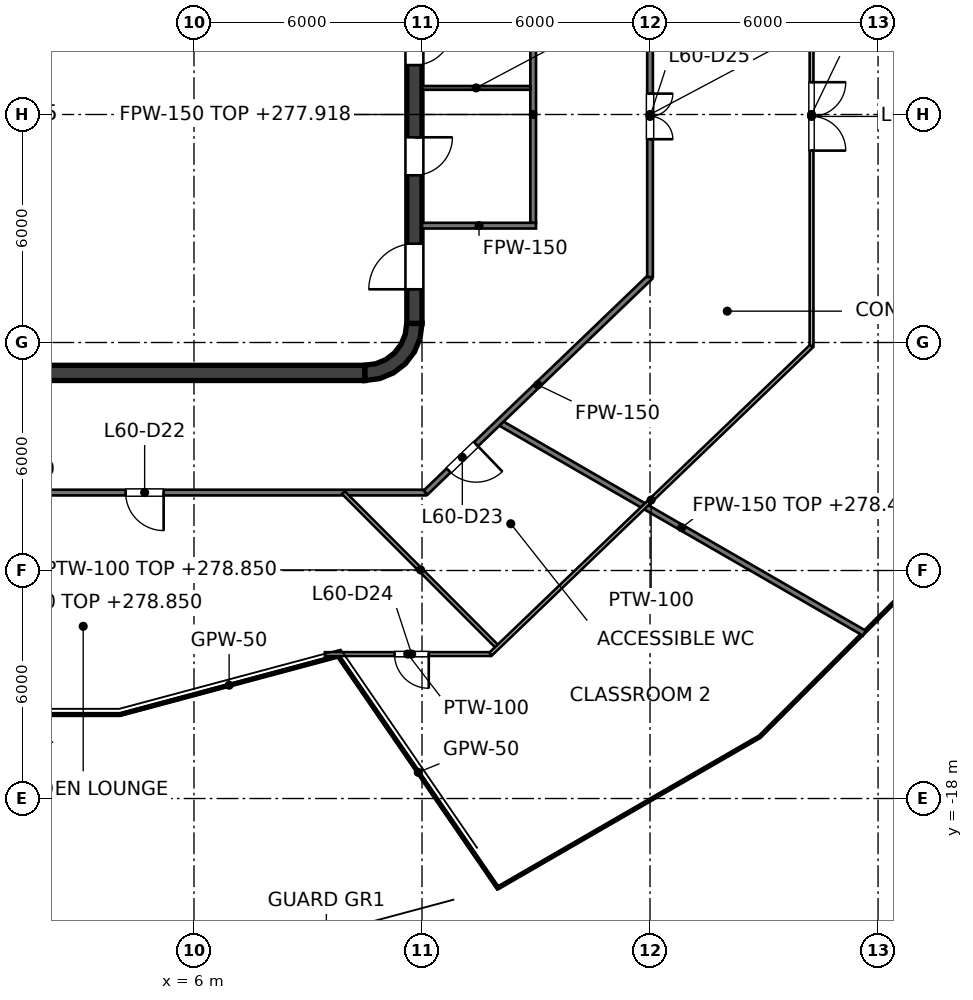
"""IFC4 building model, lengths in metres.
Left out: names, types, materials, properties, quantities, classifications, styles, units other than length and angle.
Written with IfcOpenShell. Run it as: python <this file> out.ifc"""

import sys

from ifc_helpers import new_model, si_unit, direction, frame, frame_2d, origin, place, context, subcontext, project, spatial, polyline, rectangle, outline, extrude, element, fill, save


model = new_model("IFC4")
c1 = context("Model", 3, precision=1e-05, world=origin(), true_north=direction((0.0, 1.0)))
c2 = subcontext(c1, "Body", "Model", "MODEL_VIEW")
j1 = project(units=[si_unit("LENGTHUNIT", "METRE"), si_unit("PLANEANGLEUNIT", "RADIAN")], contexts=[c1])
p1 = place(None, origin())
s1 = spatial("IfcSite", under=j1, at=p1, CompositionType="ELEMENT")
p2 = place(p1, origin())
s2 = spatial("IfcBuilding", under=s1, at=p2, CompositionType="ELEMENT")
p3 = place(p2, frame((0.0, 0.0, 275.0)))
s3 = spatial("IfcBuildingStorey", under=s2, at=p3, CompositionType="ELEMENT", Elevation=275.0)
p4 = place(p3, frame((-10.5, -6.8, 0.0), z_axis=(0.0, 0.0, 1.0), x_axis=(1.0, 0.0, 0.0)))
e1 = element("IfcWall", 1, at=p4, inside=s3, PredefinedType="SHEAR", context=c2, shape_type="SweptSolid", body=[
    extrude(rectangle(XDim=21.0, YDim=0.4, at=frame_2d((10.5, 0.0))), origin(), (0.0, 0.0, 1.0), 4.0),
])
p5 = place(p3, frame((11.8, -5.5, 0.0), z_axis=(0.0, 0.0, 1.0), x_axis=(0.0, 1.0, 0.0)))
e2 = element("IfcWall", 2, at=p5, inside=s3, PredefinedType="SHEAR", context=c2, shape_type="SweptSolid", body=[
    extrude(rectangle(XDim=11.0, YDim=0.4, at=frame_2d((5.5, 0.0))), origin(), (0.0, 0.0, 1.0), 4.0),
])
p6 = place(p5, frame((3.9, 0.0, 0.0)))
e3 = element("IfcOpeningElement", 3, at=p6, cuts=e2, PredefinedType="OPENING", context=c2, shape_type="SweptSolid", body=[
    extrude(rectangle(XDim=1.0, YDim=2.1, at=frame_2d((0.5, 1.05))), frame((0.0, 0.2, 0.0), z_axis=(0.0, -1.0, 0.0), x_axis=(1.0, 0.0, 0.0)), (0.0, 0.0, 1.0), 0.4),
])
p7 = place(p5, frame((6.8, 0.0, 0.0)))
e4 = element("IfcOpeningElement", 4, at=p7, cuts=e2, PredefinedType="OPENING", context=c2, shape_type="SweptSolid", body=[
    extrude(rectangle(XDim=1.0, YDim=2.1, at=frame_2d((0.5, 1.05))), frame((0.0, 0.2, 0.0), z_axis=(0.0, -1.0, 0.0), x_axis=(1.0, 0.0, 0.0)), (0.0, 0.0, 1.0), 0.4),
])
p8 = place(p5, frame((0.9, 0.0, 0.0)))
e5 = element("IfcOpeningElement", 5, at=p8, cuts=e2, PredefinedType="OPENING", context=c2, shape_type="SweptSolid", body=[
    extrude(rectangle(XDim=1.2, YDim=2.1, at=frame_2d((0.6, 1.05))), frame((0.0, 0.2, 0.0), z_axis=(0.0, -1.0, 0.0), x_axis=(1.0, 0.0, 0.0)), (0.0, 0.0, 1.0), 0.4),
])
p9 = place(p5, frame((8.9, 0.0, 0.0)))
e6 = element("IfcOpeningElement", 6, at=p9, cuts=e2, PredefinedType="OPENING", context=c2, shape_type="SweptSolid", body=[
    extrude(rectangle(XDim=1.2, YDim=2.1, at=frame_2d((0.6, 1.05))), frame((0.0, 0.2, 0.0), z_axis=(0.0, -1.0, 0.0), x_axis=(1.0, 0.0, 0.0)), (0.0, 0.0, 1.0), 0.4),
])
p10 = place(p3, origin())
e7 = element("IfcWall", 7, at=p10, inside=s3, PredefinedType="SHEAR", context=c2, shape_type="SweptSolid", body=[
    extrude(outline(polyline([(12.0, -5.5), (11.596, -5.5), (11.559, -5.784), (11.45, -6.048), (11.275, -6.275), (11.048, -6.45), (10.784, -6.559), (10.5, -6.596), (10.5, -7.0), (10.888, -6.949), (11.25, -6.799), (11.561, -6.561), (11.799, -6.25), (11.949, -5.888), (12.0, -5.5)])), origin(), (0.0, 0.0, 1.0), 4.0),
])
p11 = place(p3, frame((9.0, -6.6, 0.0), z_axis=(0.0, 0.0, 1.0), x_axis=(0.0, 1.0, 0.0)))
e8 = element("IfcWall", 8, at=p11, inside=s3, PredefinedType="SOLIDWALL", context=c2, shape_type="SweptSolid", body=[
    extrude(rectangle(XDim=2.5, YDim=0.25, at=frame_2d((1.25, 0.0))), origin(), (0.0, 0.0, 1.0), 3.85),
])
p12 = place(p11, frame((0.65, 0.0, 0.0)))
e9 = element("IfcOpeningElement", 9, at=p12, cuts=e8, PredefinedType="OPENING", context=c2, shape_type="SweptSolid", body=[
    extrude(rectangle(XDim=1.2, YDim=2.1, at=frame_2d((0.6, 1.05))), frame((0.0, 0.125, 0.0), z_axis=(0.0, -1.0, 0.0), x_axis=(1.0, 0.0, 0.0)), (0.0, 0.0, 1.0), 0.25),
])
p13 = place(p3, frame((3.15, -6.6, 0.0), z_axis=(0.0, 0.0, 1.0), x_axis=(0.0, 1.0, 0.0)))
e10 = element("IfcWall", 10, at=p13, inside=s3, PredefinedType="SOLIDWALL", context=c2, shape_type="SweptSolid", body=[
    extrude(rectangle(XDim=2.5, YDim=0.25, at=frame_2d((1.25, 0.0))), origin(), (0.0, 0.0, 1.0), 3.85),
])
p14 = place(p3, frame((0.775, 1.525, 0.0), z_axis=(0.0, 0.0, 1.0), x_axis=(1.0, 0.0, 0.0)))
e11 = element("IfcWall", 11, at=p14, inside=s3, PredefinedType="SOLIDWALL", context=c2, shape_type="SweptSolid", body=[
    extrude(rectangle(XDim=8.35, YDim=0.25, at=frame_2d((4.175, 0.0))), origin(), (0.0, 0.0, 1.0), 3.85),
])
p15 = place(p14, frame((0.925, 0.0, 0.0)))
e12 = element("IfcOpeningElement", 12, at=p15, cuts=e11, PredefinedType="OPENING", context=c2, shape_type="SweptSolid", body=[
    extrude(rectangle(XDim=1.1, YDim=2.1, at=frame_2d((0.55, 1.05))), frame((0.0, 0.125, 0.0), z_axis=(0.0, -1.0, 0.0), x_axis=(1.0, 0.0, 0.0)), (0.0, 0.0, 1.0), 0.25),
])
p16 = place(p14, frame((3.625, 0.0, 0.0)))
e13 = element("IfcOpeningElement", 13, at=p16, cuts=e11, PredefinedType="OPENING", context=c2, shape_type="SweptSolid", body=[
    extrude(rectangle(XDim=1.1, YDim=2.1, at=frame_2d((0.55, 1.05))), frame((0.0, 0.125, 0.0), z_axis=(0.0, -1.0, 0.0), x_axis=(1.0, 0.0, 0.0)), (0.0, 0.0, 1.0), 0.25),
])
p17 = place(p14, frame((6.325, 0.0, 0.0)))
e14 = element("IfcOpeningElement", 14, at=p17, cuts=e11, PredefinedType="OPENING", context=c2, shape_type="SweptSolid", body=[
    extrude(rectangle(XDim=1.1, YDim=2.1, at=frame_2d((0.55, 1.05))), frame((0.0, 0.125, 0.0), z_axis=(0.0, -1.0, 0.0), x_axis=(1.0, 0.0, 0.0)), (0.0, 0.0, 1.0), 0.25),
])
p18 = place(p3, frame((-9.125, -1.525, 0.0), z_axis=(0.0, 0.0, 1.0), x_axis=(1.0, 0.0, 0.0)))
e15 = element("IfcWall", 15, at=p18, inside=s3, PredefinedType="SOLIDWALL", context=c2, shape_type="SweptSolid", body=[
    extrude(rectangle(XDim=18.25, YDim=0.25, at=frame_2d((9.125, 0.0))), origin(), (0.0, 0.0, 1.0), 3.85),
])
p19 = place(p18, frame((7.15, 0.0, 0.0)))
e16 = element("IfcOpeningElement", 16, at=p19, cuts=e15, PredefinedType="OPENING", context=c2, shape_type="SweptSolid", body=[
    extrude(rectangle(XDim=1.2, YDim=2.1, at=frame_2d((0.6, 1.05))), frame((0.0, 0.125, 0.0), z_axis=(0.0, -1.0, 0.0), x_axis=(1.0, 0.0, 0.0)), (0.0, 0.0, 1.0), 0.25),
])
p20 = place(p18, frame((10.2, 0.0, 0.0)))
e17 = element("IfcOpeningElement", 17, at=p20, cuts=e15, PredefinedType="OPENING", context=c2, shape_type="SweptSolid", body=[
    extrude(rectangle(XDim=1.2, YDim=2.1, at=frame_2d((0.6, 1.05))), frame((0.0, 0.125, 0.0), z_axis=(0.0, -1.0, 0.0), x_axis=(1.0, 0.0, 0.0)), (0.0, 0.0, 1.0), 0.25),
])
p21 = place(p18, frame((16.075, 0.0, 0.0)))
e18 = element("IfcOpeningElement", 18, at=p21, cuts=e15, PredefinedType="OPENING", context=c2, shape_type="SweptSolid", body=[
    extrude(rectangle(XDim=1.0, YDim=2.1, at=frame_2d((0.5, 1.05))), frame((0.0, 0.125, 0.0), z_axis=(0.0, -1.0, 0.0), x_axis=(1.0, 0.0, 0.0)), (0.0, 0.0, 1.0), 0.25),
])
p22 = place(p3, frame((-9.125, -3.975, 0.0), z_axis=(0.0, 0.0, 1.0), x_axis=(1.0, 0.0, 0.0)))
e19 = element("IfcWall", 19, at=p22, inside=s3, PredefinedType="SOLIDWALL", context=c2, shape_type="SweptSolid", body=[
    extrude(rectangle(XDim=12.4, YDim=0.25, at=frame_2d((6.2, 0.0))), origin(), (0.0, 0.0, 1.0), 3.85),
])
p23 = place(p22, frame((1.05, 0.0, 0.0)))
e20 = element("IfcOpeningElement", 20, at=p23, cuts=e19, PredefinedType="OPENING", context=c2, shape_type="SweptSolid", body=[
    extrude(rectangle(XDim=1.2, YDim=2.1, at=frame_2d((0.6, 1.05))), frame((0.0, 0.125, 0.0), z_axis=(0.0, -1.0, 0.0), x_axis=(1.0, 0.0, 0.0)), (0.0, 0.0, 1.0), 0.25),
])
p24 = place(p22, frame((4.1, 0.0, 0.0)))
e21 = element("IfcOpeningElement", 21, at=p24, cuts=e19, PredefinedType="OPENING", context=c2, shape_type="SweptSolid", body=[
    extrude(rectangle(XDim=1.2, YDim=2.1, at=frame_2d((0.6, 1.05))), frame((0.0, 0.125, 0.0), z_axis=(0.0, -1.0, 0.0), x_axis=(1.0, 0.0, 0.0)), (0.0, 0.0, 1.0), 0.25),
])
p25 = place(p3, frame((3.275, -3.975, 0.0), z_axis=(0.0, 0.0, 1.0), x_axis=(1.0, 0.0, 0.0)))
e22 = element("IfcWall", 22, at=p25, inside=s3, PredefinedType="SOLIDWALL", context=c2, shape_type="SweptSolid", body=[
    extrude(rectangle(XDim=5.85, YDim=0.25, at=frame_2d((2.925, 0.0))), origin(), (0.0, 0.0, 1.0), 3.85),
])
for number, where, z_axis, x_axis in (
    (23, (3.2, -3.85, 0.0), (0.0, 0.0, 1.0), (0.0, 1.0, 0.0)),
    (24, (5.9, -3.85, 0.0), (0.0, 0.0, 1.0), (0.0, 1.0, 0.0)),
    (25, (9.0, -3.85, 0.0), (0.0, 0.0, 1.0), (0.0, 1.0, 0.0)),
):
    element("IfcWall", number, at=place(p3, frame(where, z_axis=z_axis, x_axis=x_axis)), inside=s3, PredefinedType="SOLIDWALL", context=c2, shape_type="SweptSolid", body=[
        extrude(rectangle(XDim=2.2, YDim=0.25, at=frame_2d((1.1, 0.0))), origin(), (0.0, 0.0, 1.0), 3.85),
    ])
p26 = place(p3, frame((14.925, -2.85, 0.0), z_axis=(0.0, 0.0, 1.0), x_axis=(0.0, 1.0, 0.0)))
e26 = element("IfcWall", 26, at=p26, inside=s3, PredefinedType="PARTITIONING", context=c2, shape_type="SweptSolid", body=[
    extrude(rectangle(XDim=5.7, YDim=0.15, at=frame_2d((2.85, 0.0))), origin(), (0.0, 0.0, 1.0), 2.918),
])
p27 = place(p3, frame((12.0, -2.925, 0.0), z_axis=(0.0, 0.0, 1.0), x_axis=(1.0, 0.0, 0.0)))
e27 = element("IfcWall", 27, at=p27, inside=s3, PredefinedType="PARTITIONING", context=c2, shape_type="SweptSolid", body=[
    extrude(rectangle(XDim=3.0, YDim=0.15, at=frame_2d((1.5, 0.0))), origin(), (0.0, 0.0, 1.0), 2.927),
])
p28 = place(p3, frame((12.0, 0.7, 0.0), z_axis=(0.0, 0.0, 1.0), x_axis=(1.0, 0.0, 0.0)))
e28 = element("IfcWall", 28, at=p28, inside=s3, PredefinedType="PARTITIONING", context=c2, shape_type="SweptSolid", body=[
    extrude(rectangle(XDim=2.85, YDim=0.1, at=frame_2d((1.425, 0.0))), origin(), (0.0, 0.0, 1.0), 3.85),
])
p29 = place(p3, frame((14.024, -8.097, 0.0), z_axis=(0.0, 0.0, 1.0), x_axis=(0.86601678782, -0.50001492299, 0.0)))
e29 = element("IfcWall", 29, at=p29, inside=s3, PredefinedType="PARTITIONING", context=c2, shape_type="SweptSolid", body=[
    extrude(rectangle(XDim=11.104, YDim=0.15, at=frame_2d((5.552, 0.0))), origin(), (0.0, 0.0, 1.0), 3.475),
])
p30 = place(p3, frame((-12.095, -9.949, 0.0), z_axis=(0.0, 0.0, 1.0), x_axis=(1.0, 0.0, 0.0)))
e30 = element("IfcWall", 30, at=p30, inside=s3, PredefinedType="PARTITIONING", context=c2, shape_type="SweptSolid", body=[
    extrude(rectangle(XDim=24.19, YDim=0.15, at=frame_2d((12.095, 0.0))), origin(), (0.0, 0.0, 1.0), 2.927),
])
p31 = place(p30, frame((4.215, 0.0, 0.0)))
e31 = element("IfcOpeningElement", 31, at=p31, cuts=e30, PredefinedType="OPENING", context=c2, shape_type="SweptSolid", body=[
    extrude(rectangle(XDim=1.0, YDim=2.1, at=frame_2d((0.5, 1.05))), frame((0.0, 0.075, 0.0), z_axis=(0.0, -1.0, 0.0), x_axis=(1.0, 0.0, 0.0)), (0.0, 0.0, 1.0), 0.15),
])
p32 = place(p30, frame((10.029, 0.0, 0.0)))
e32 = element("IfcOpeningElement", 32, at=p32, cuts=e30, PredefinedType="OPENING", context=c2, shape_type="SweptSolid", body=[
    extrude(rectangle(XDim=1.0, YDim=2.1, at=frame_2d((0.5, 1.05))), frame((0.0, 0.075, 0.0), z_axis=(0.0, -1.0, 0.0), x_axis=(1.0, 0.0, 0.0)), (0.0, 0.0, 1.0), 0.15),
])
p33 = place(p30, frame((16.297, 0.0, 0.0)))
e33 = element("IfcOpeningElement", 33, at=p33, cuts=e30, PredefinedType="OPENING", context=c2, shape_type="SweptSolid", body=[
    extrude(rectangle(XDim=1.0, YDim=2.1, at=frame_2d((0.5, 1.05))), frame((0.0, 0.075, 0.0), z_axis=(0.0, -1.0, 0.0), x_axis=(1.0, 0.0, 0.0)), (0.0, 0.0, 1.0), 0.15),
])
p34 = place(p3, frame((12.095, -9.949, 0.0), z_axis=(0.0, 0.0, 1.0), x_axis=(0.721290181137, 0.692633001376, 0.0)))
e34 = element("IfcWall", 34, at=p34, inside=s3, PredefinedType="PARTITIONING", context=c2, shape_type="SweptSolid", body=[
    extrude(rectangle(XDim=8.187, YDim=0.15, at=frame_2d((4.094, 0.0))), origin(), (0.0, 0.0, 1.0), 2.927),
])
p35 = place(p34, frame((0.839, 0.0, 0.0)))
e35 = element("IfcOpeningElement", 35, at=p35, cuts=e34, PredefinedType="OPENING", context=c2, shape_type="SweptSolid", body=[
    extrude(rectangle(XDim=1.0, YDim=2.1, at=frame_2d((0.5, 1.05))), frame((0.0, 0.075, 0.0), z_axis=(0.0, -1.0, 0.0), x_axis=(1.0, 0.0, 0.0)), (0.0, 0.0, 1.0), 0.15),
])
p36 = place(p3, frame((18.0, -4.278, 0.0), z_axis=(0.0, 0.0, 1.0), x_axis=(0.0, 1.0, 0.0)))
e36 = element("IfcWall", 36, at=p36, inside=s3, PredefinedType="PARTITIONING", context=c2, shape_type="SweptSolid", body=[
    extrude(rectangle(XDim=8.556, YDim=0.15, at=frame_2d((4.278, 0.0))), origin(), (0.0, 0.0, 1.0), 2.918),
])
p37 = place(p36, frame((3.627, 0.0, 0.0)))
e37 = element("IfcOpeningElement", 37, at=p37, cuts=e36, PredefinedType="OPENING", context=c2, shape_type="SweptSolid", body=[
    extrude(rectangle(XDim=1.2, YDim=2.1, at=frame_2d((0.6, 1.05))), frame((0.0, 0.075, 0.0), z_axis=(0.0, -1.0, 0.0), x_axis=(1.0, 0.0, 0.0)), (0.0, 0.0, 1.0), 0.15),
])
p38 = place(p3, frame((9.797, -14.251, 0.0), z_axis=(0.0, 0.0, 1.0), x_axis=(0.566456270614, -0.824091799184, 0.0)))
e38 = element("IfcWall", 38, at=p38, inside=s3, PredefinedType="PARTITIONING", context=c2, shape_type="SweptSolid", body=[
    extrude(rectangle(XDim=7.427, YDim=0.05, at=frame_2d((3.713, 0.0))), origin(), (0.0, 0.0, 1.0), 2.927),
])
p39 = place(p3, frame((-4.054, -15.79, 0.0), z_axis=(0.0, 0.0, 1.0), x_axis=(1.0, 0.0, 0.0)))
e39 = element("IfcWall", 39, at=p39, inside=s3, PredefinedType="PARTITIONING", context=c2, shape_type="SweptSolid", body=[
    extrude(rectangle(XDim=8.108, YDim=0.05, at=frame_2d((4.054, 0.0))), origin(), (0.0, 0.0, 1.0), 2.927),
])
p40 = place(p3, frame((4.054, -15.79, 0.0), z_axis=(0.0, 0.0, 1.0), x_axis=(0.965719156344, 0.259589119708, 0.0)))
e40 = element("IfcWall", 40, at=p40, inside=s3, PredefinedType="PARTITIONING", context=c2, shape_type="SweptSolid", body=[
    extrude(rectangle(XDim=5.946, YDim=0.05, at=frame_2d((2.973, 0.0))), origin(), (0.0, 0.0, 1.0), 2.927),
])
p41 = place(p3, frame((9.931, -9.949, 0.0), z_axis=(0.0, 0.0, 1.0), x_axis=(0.706405887394, -0.707806980932, 0.0)))
e41 = element("IfcWall", 41, at=p41, inside=s3, PredefinedType="PARTITIONING", context=c2, shape_type="SweptSolid", body=[
    extrude(rectangle(XDim=5.75, YDim=0.1, at=frame_2d((2.875, 0.0))), origin(), (0.0, 0.0, 1.0), 3.85),
])
p42 = place(p3, frame((9.445, -14.199, 0.0), z_axis=(0.0, 0.0, 1.0), x_axis=(1.0, 0.0, 0.0)))
e42 = element("IfcWall", 42, at=p42, inside=s3, PredefinedType="PARTITIONING", context=c2, shape_type="SweptSolid", body=[
    extrude(rectangle(XDim=4.36, YDim=0.1, at=frame_2d((2.18, 0.0))), origin(), (0.0, 0.0, 1.0), 2.927),
])
p43 = place(p42, frame((1.833, 0.0, 0.0)))
e43 = element("IfcOpeningElement", 43, at=p43, cuts=e42, PredefinedType="OPENING", context=c2, shape_type="SweptSolid", body=[
    extrude(rectangle(XDim=0.9, YDim=2.1, at=frame_2d((0.45, 1.05))), frame((0.0, 0.05, 0.0), z_axis=(0.0, -1.0, 0.0), x_axis=(1.0, 0.0, 0.0)), (0.0, 0.0, 1.0), 0.1),
])
p44 = place(p3, frame((13.805, -14.199, 0.0), z_axis=(0.0, 0.0, 1.0), x_axis=(0.721439820897, 0.69247713668, 0.0)))
e44 = element("IfcWall", 44, at=p44, inside=s3, PredefinedType="PARTITIONING", context=c2, shape_type="SweptSolid", body=[
    extrude(rectangle(XDim=11.708, YDim=0.1, at=frame_2d((5.854, 0.0))), origin(), (0.0, 0.0, 1.0), 2.927),
])
p45 = place(p3, frame((22.25, -6.089, 0.0), z_axis=(0.0, 0.0, 1.0), x_axis=(0.0, 1.0, 0.0)))
e45 = element("IfcWall", 45, at=p45, inside=s3, PredefinedType="PARTITIONING", context=c2, shape_type="SweptSolid", body=[
    extrude(rectangle(XDim=12.178, YDim=0.1, at=frame_2d((6.089, 0.0))), origin(), (0.0, 0.0, 1.0), 2.918),
])
p46 = place(p45, frame((5.139, 0.0, 0.0)))
e46 = element("IfcOpeningElement", 46, at=p46, cuts=e45, PredefinedType="OPENING", context=c2, shape_type="SweptSolid", body=[
    extrude(rectangle(XDim=1.8, YDim=2.1, at=frame_2d((0.9, 1.05))), frame((0.0, 0.05, 0.0), z_axis=(0.0, -1.0, 0.0), x_axis=(1.0, 0.0, 0.0)), (0.0, 0.0, 1.0), 0.1),
])
p47 = place(p15, origin())
e47 = element("IfcDoor", 47, at=p47, inside=s3, OperationType="DOUBLE_DOOR_SLIDING", PredefinedType="DOOR", context=c2, shape_type="SweptSolid", body=[
    extrude(rectangle(XDim=1.1, YDim=2.1, at=frame_2d((0.55, 1.05))), frame((0.0, 0.025, 0.0), z_axis=(0.0, -1.0, 0.0), x_axis=(1.0, 0.0, 0.0)), (0.0, 0.0, 1.0), 0.05),
])
fill(e12, e47)
p48 = place(p16, origin())
e48 = element("IfcDoor", 48, at=p48, inside=s3, OperationType="DOUBLE_DOOR_SLIDING", PredefinedType="DOOR", context=c2, shape_type="SweptSolid", body=[
    extrude(rectangle(XDim=1.1, YDim=2.1, at=frame_2d((0.55, 1.05))), frame((0.0, 0.025, 0.0), z_axis=(0.0, -1.0, 0.0), x_axis=(1.0, 0.0, 0.0)), (0.0, 0.0, 1.0), 0.05),
])
fill(e13, e48)
p49 = place(p17, origin())
e49 = element("IfcDoor", 49, at=p49, inside=s3, OperationType="DOUBLE_DOOR_SLIDING", PredefinedType="DOOR", context=c2, shape_type="SweptSolid", body=[
    extrude(rectangle(XDim=1.1, YDim=2.1, at=frame_2d((0.55, 1.05))), frame((0.0, 0.025, 0.0), z_axis=(0.0, -1.0, 0.0), x_axis=(1.0, 0.0, 0.0)), (0.0, 0.0, 1.0), 0.05),
])
fill(e14, e49)
p50 = place(p20, origin())
e50 = element("IfcDoor", 50, at=p50, inside=s3, OperationType="DOUBLE_DOOR_SLIDING", PredefinedType="DOOR", context=c2, shape_type="SweptSolid", body=[
    extrude(rectangle(XDim=1.2, YDim=2.1, at=frame_2d((0.6, 1.05))), frame((0.0, 0.025, 0.0), z_axis=(0.0, -1.0, 0.0), x_axis=(1.0, 0.0, 0.0)), (0.0, 0.0, 1.0), 0.05),
])
fill(e17, e50)
p51 = place(p12, origin())
e51 = element("IfcDoor", 51, at=p51, inside=s3, OperationType="SINGLE_SWING_LEFT", PredefinedType="DOOR", context=c2, shape_type="SweptSolid", body=[
    extrude(rectangle(XDim=1.2, YDim=2.1, at=frame_2d((0.6, 1.05))), frame((0.0, 0.025, 0.0), z_axis=(0.0, -1.0, 0.0), x_axis=(1.0, 0.0, 0.0)), (0.0, 0.0, 1.0), 0.05),
])
fill(e9, e51)
p52 = place(p21, origin())
e52 = element("IfcDoor", 52, at=p52, inside=s3, OperationType="SINGLE_SWING_RIGHT", PredefinedType="DOOR", context=c2, shape_type="SweptSolid", body=[
    extrude(rectangle(XDim=1.0, YDim=2.1, at=frame_2d((0.5, 1.05))), frame((0.0, 0.025, 0.0), z_axis=(0.0, -1.0, 0.0), x_axis=(1.0, 0.0, 0.0)), (0.0, 0.0, 1.0), 0.05),
])
fill(e18, e52)
p53 = place(p6, origin())
e53 = element("IfcDoor", 53, at=p53, inside=s3, OperationType="SINGLE_SWING_RIGHT", PredefinedType="DOOR", context=c2, shape_type="SweptSolid", body=[
    extrude(rectangle(XDim=1.0, YDim=2.1, at=frame_2d((0.5, 1.05))), frame((0.0, 0.025, 0.0), z_axis=(0.0, -1.0, 0.0), x_axis=(1.0, 0.0, 0.0)), (0.0, 0.0, 1.0), 0.05),
])
fill(e3, e53)
p54 = place(p7, origin())
e54 = element("IfcDoor", 54, at=p54, inside=s3, OperationType="SINGLE_SWING_RIGHT", PredefinedType="DOOR", context=c2, shape_type="SweptSolid", body=[
    extrude(rectangle(XDim=1.0, YDim=2.1, at=frame_2d((0.5, 1.05))), frame((0.0, 0.025, 0.0), z_axis=(0.0, -1.0, 0.0), x_axis=(1.0, 0.0, 0.0)), (0.0, 0.0, 1.0), 0.05),
])
fill(e4, e54)
p55 = place(p8, origin())
e55 = element("IfcDoor", 55, at=p55, inside=s3, OperationType="SINGLE_SWING_LEFT", PredefinedType="DOOR", context=c2, shape_type="SweptSolid", body=[
    extrude(rectangle(XDim=1.2, YDim=2.1, at=frame_2d((0.6, 1.05))), frame((0.0, 0.025, 0.0), z_axis=(0.0, -1.0, 0.0), x_axis=(1.0, 0.0, 0.0)), (0.0, 0.0, 1.0), 0.05),
])
fill(e5, e55)
p56 = place(p33, origin())
e56 = element("IfcDoor", 56, at=p56, inside=s3, OperationType="SINGLE_SWING_RIGHT", PredefinedType="DOOR", context=c2, shape_type="SweptSolid", body=[
    extrude(rectangle(XDim=1.0, YDim=2.1, at=frame_2d((0.5, 1.05))), frame((0.0, 0.025, 0.0), z_axis=(0.0, -1.0, 0.0), x_axis=(1.0, 0.0, 0.0)), (0.0, 0.0, 1.0), 0.05),
])
fill(e33, e56)
p57 = place(p35, origin())
e57 = element("IfcDoor", 57, at=p57, inside=s3, OperationType="SINGLE_SWING_RIGHT", PredefinedType="DOOR", context=c2, shape_type="SweptSolid", body=[
    extrude(rectangle(XDim=1.0, YDim=2.1, at=frame_2d((0.5, 1.05))), frame((0.0, 0.025, 0.0), z_axis=(0.0, -1.0, 0.0), x_axis=(1.0, 0.0, 0.0)), (0.0, 0.0, 1.0), 0.05),
])
fill(e35, e57)
p58 = place(p43, origin())
e58 = element("IfcDoor", 58, at=p58, inside=s3, OperationType="SINGLE_SWING_RIGHT", PredefinedType="DOOR", context=c2, shape_type="SweptSolid", body=[
    extrude(rectangle(XDim=0.9, YDim=2.1, at=frame_2d((0.45, 1.05))), frame((0.0, 0.025, 0.0), z_axis=(0.0, -1.0, 0.0), x_axis=(1.0, 0.0, 0.0)), (0.0, 0.0, 1.0), 0.05),
])
fill(e43, e58)
p59 = place(p37, origin())
e59 = element("IfcDoor", 59, at=p59, inside=s3, OperationType="DOUBLE_DOOR_SINGLE_SWING", PredefinedType="DOOR", context=c2, shape_type="SweptSolid", body=[
    extrude(rectangle(XDim=1.2, YDim=2.1, at=frame_2d((0.6, 1.05))), frame((0.0, 0.025, 0.0), z_axis=(0.0, -1.0, 0.0), x_axis=(1.0, 0.0, 0.0)), (0.0, 0.0, 1.0), 0.05),
])
fill(e37, e59)
p60 = place(p46, origin())
e60 = element("IfcDoor", 60, at=p60, inside=s3, OperationType="DOUBLE_DOOR_SINGLE_SWING", PredefinedType="DOOR", context=c2, shape_type="SweptSolid", body=[
    extrude(rectangle(XDim=1.8, YDim=2.1, at=frame_2d((0.9, 1.05))), frame((0.0, 0.025, 0.0), z_axis=(0.0, -1.0, 0.0), x_axis=(1.0, 0.0, 0.0)), (0.0, 0.0, 1.0), 0.05),
])
fill(e46, e60)
save(model, sys.argv[1])
